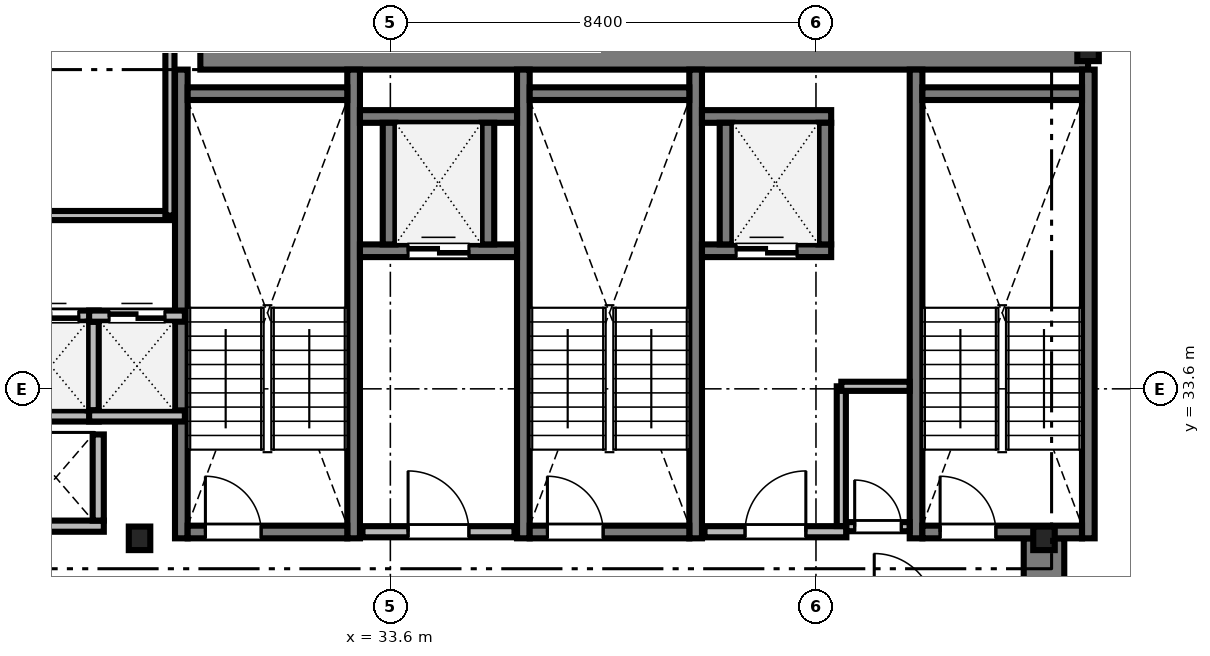
"""IFC4 building model, lengths in metres.
Left out: names, types, materials, properties, quantities, classifications, styles, units other than length and angle.
Written with IfcOpenShell. Run it as: python <this file> out.ifc"""

import sys

from ifc_helpers import new_model, si_unit, direction, frame, frame_2d, origin, origin_2d, place, context, subcontext, project, spatial, rectangle, i_section, extrude, source, transform, mapped, element, fill, save


model = new_model("IFC4")
c1 = context("Model", 3, precision=1e-05, world=origin(), true_north=direction((0.0, 1.0)))
c2 = subcontext(c1, "Body", "Model", "MODEL_VIEW")
j1 = project(units=[si_unit("LENGTHUNIT", "METRE"), si_unit("PLANEANGLEUNIT", "RADIAN")], contexts=[c1])
p1 = place(None, origin())
s1 = spatial("IfcSite", under=j1, at=p1, CompositionType="ELEMENT")
p2 = place(p1, origin())
s2 = spatial("IfcBuilding", under=s1, at=p2, CompositionType="ELEMENT")
p3 = place(p2, frame((0.0, 0.0, 163.1)))
s3 = spatial("IfcBuildingStorey", under=s2, at=p3, CompositionType="ELEMENT", Elevation=163.1)
m1 = source(origin(), c2, "Body", "SweptSolid", [
    extrude(rectangle(XDim=17.52, YDim=0.8, at=frame_2d((8.76, 0.0))), origin(), (0.0, 0.0, 1.0), 3.05),
])
p4 = place(p3, frame((29.85, 40.3, 0.0), z_axis=(0.0, 0.0, 1.0), x_axis=(1.0, 0.0, 0.0)))
e1 = element("IfcWall", 1, at=p4, inside=s3, PredefinedType="SHEAR", context=c2, shape_type="MappedRepresentation", body=[
    mapped(m1, transform((0.0, 0.0, 0.0), scale=1.0)),
])
m2 = source(origin(), c2, "Body", "SweptSolid", [
    extrude(rectangle(XDim=13.15, YDim=0.8, at=frame_2d((6.575, 0.0))), origin(), (0.0, 0.0, 1.0), 3.05),
])
p5 = place(p3, frame((46.5, 17.5, 0.0), z_axis=(0.0, 0.0, 1.0), x_axis=(0.0, 1.0, 0.0)))
e2 = element("IfcWall", 2, at=p5, inside=s3, PredefinedType="SHEAR", context=c2, shape_type="MappedRepresentation", body=[
    mapped(m2, transform((0.0, 0.0, 0.0), scale=1.0)),
])
m3 = source(origin(), c2, "Body", "SweptSolid", [
    extrude(i_section(OverallWidth=0.424, OverallDepth=0.465, WebThickness=0.035, FlangeThickness=0.056, FilletRadius=0.015, at=origin_2d()), origin(), (0.0, 0.0, 1.0), 3.05),
])
for number, where, z_axis, x_axis in (
    (3, (28.65, 30.65, 0.0), (0.0, 0.0, 1.0), (1.0, 0.0, 0.0)),
    (4, (46.5, 30.65, 0.0), (0.0, 0.0, 1.0), (1.0, 0.0, 0.0)),
    (5, (47.37, 40.3, 0.0), (0.0, 0.0, 1.0), (1.0, 0.0, 0.0)),
):
    element("IfcColumn", number, at=place(p3, frame(where, z_axis=z_axis, x_axis=x_axis)), inside=s3, PredefinedType="COLUMN", context=c2, shape_type="MappedRepresentation", body=[
        mapped(m3, transform((0.0, 0.0, 0.0), scale=1.0)),
    ])
m4 = source(origin(), c2, "Body", "SweptSolid", [
    extrude(rectangle(XDim=9.25, YDim=0.25, at=frame_2d((4.625, 0.0))), origin(), (0.0, 0.0, 1.0), 3.5),
])
for number, where, z_axis, x_axis in (
    (6, (29.475, 30.65, 0.0), (0.0, 0.0, 1.0), (0.0, 1.0, 0.0)),
    (7, (32.875, 30.65, 0.0), (0.0, 0.0, 1.0), (0.0, 1.0, 0.0)),
):
    element("IfcWall", number, at=place(p3, frame(where, z_axis=z_axis, x_axis=x_axis)), inside=s3, PredefinedType="SOLIDWALL", context=c2, shape_type="MappedRepresentation", body=[
        mapped(m4, transform((0.0, 0.0, 0.0), scale=1.0)),
    ])
m5 = source(origin(), c2, "Body", "SweptSolid", [
    extrude(rectangle(XDim=3.15, YDim=0.25, at=frame_2d((1.575, 0.0))), origin(), (0.0, 0.0, 1.0), 3.5),
])
p6 = place(p3, frame((29.6, 39.425, 0.0), z_axis=(0.0, 0.0, 1.0), x_axis=(1.0, 0.0, 0.0)))
e8 = element("IfcWall", 8, at=p6, inside=s3, PredefinedType="SOLIDWALL", context=c2, shape_type="MappedRepresentation", body=[
    mapped(m5, transform((0.0, 0.0, 0.0), scale=1.0)),
])
p7 = place(p3, frame((29.6, 30.775, 0.0), z_axis=(0.0, 0.0, 1.0), x_axis=(1.0, 0.0, 0.0)))
e9 = element("IfcWall", 9, at=p7, inside=s3, PredefinedType="SOLIDWALL", context=c2, shape_type="MappedRepresentation", body=[
    mapped(m5, transform((0.0, 0.0, 0.0), scale=1.0)),
])
m6 = source(origin(), c2, "Body", "SweptSolid", [
    extrude(rectangle(XDim=1.1, YDim=2.2, at=frame_2d((0.55, 1.1))), frame((0.0, 0.135, 0.0), z_axis=(0.0, -1.0, 0.0), x_axis=(1.0, 0.0, 0.0)), (0.0, 0.0, 1.0), 0.27),
])
p8 = place(p7, frame((0.35, 0.0, 0.0)))
e10 = element("IfcOpeningElement", 10, at=p8, cuts=e9, PredefinedType="OPENING", context=c2, shape_type="MappedRepresentation", body=[
    mapped(m6, transform((0.0, 0.0, 0.0), scale=1.0)),
])
for number, where, z_axis, x_axis in (
    (11, (36.225, 30.65, 0.0), (0.0, 0.0, 1.0), (0.0, 1.0, 0.0)),
    (12, (39.625, 30.65, 0.0), (0.0, 0.0, 1.0), (0.0, 1.0, 0.0)),
):
    element("IfcWall", number, at=place(p3, frame(where, z_axis=z_axis, x_axis=x_axis)), inside=s3, PredefinedType="SOLIDWALL", context=c2, shape_type="MappedRepresentation", body=[
        mapped(m4, transform((0.0, 0.0, 0.0), scale=1.0)),
    ])
p9 = place(p3, frame((36.35, 39.425, 0.0), z_axis=(0.0, 0.0, 1.0), x_axis=(1.0, 0.0, 0.0)))
e13 = element("IfcWall", 13, at=p9, inside=s3, PredefinedType="SOLIDWALL", context=c2, shape_type="MappedRepresentation", body=[
    mapped(m5, transform((0.0, 0.0, 0.0), scale=1.0)),
])
p10 = place(p3, frame((36.35, 30.775, 0.0), z_axis=(0.0, 0.0, 1.0), x_axis=(1.0, 0.0, 0.0)))
e14 = element("IfcWall", 14, at=p10, inside=s3, PredefinedType="SOLIDWALL", context=c2, shape_type="MappedRepresentation", body=[
    mapped(m5, transform((0.0, 0.0, 0.0), scale=1.0)),
])
p11 = place(p10, frame((0.35, 0.0, 0.0)))
e15 = element("IfcOpeningElement", 15, at=p11, cuts=e14, PredefinedType="OPENING", context=c2, shape_type="MappedRepresentation", body=[
    mapped(m6, transform((0.0, 0.0, 0.0), scale=1.0)),
])
for number, where, z_axis, x_axis in (
    (16, (43.975, 30.65, 0.0), (0.0, 0.0, 1.0), (0.0, 1.0, 0.0)),
    (17, (47.375, 30.65, 0.0), (0.0, 0.0, 1.0), (0.0, 1.0, 0.0)),
):
    element("IfcWall", number, at=place(p3, frame(where, z_axis=z_axis, x_axis=x_axis)), inside=s3, PredefinedType="SOLIDWALL", context=c2, shape_type="MappedRepresentation", body=[
        mapped(m4, transform((0.0, 0.0, 0.0), scale=1.0)),
    ])
p12 = place(p3, frame((44.1, 39.425, 0.0), z_axis=(0.0, 0.0, 1.0), x_axis=(1.0, 0.0, 0.0)))
e18 = element("IfcWall", 18, at=p12, inside=s3, PredefinedType="SOLIDWALL", context=c2, shape_type="MappedRepresentation", body=[
    mapped(m5, transform((0.0, 0.0, 0.0), scale=1.0)),
])
p13 = place(p3, frame((44.1, 30.775, 0.0), z_axis=(0.0, 0.0, 1.0), x_axis=(1.0, 0.0, 0.0)))
e19 = element("IfcWall", 19, at=p13, inside=s3, PredefinedType="SOLIDWALL", context=c2, shape_type="MappedRepresentation", body=[
    mapped(m5, transform((0.0, 0.0, 0.0), scale=1.0)),
])
p14 = place(p13, frame((0.35, 0.0, 0.0)))
e20 = element("IfcOpeningElement", 20, at=p14, cuts=e19, PredefinedType="OPENING", context=c2, shape_type="MappedRepresentation", body=[
    mapped(m6, transform((0.0, 0.0, 0.0), scale=1.0)),
])
m7 = source(origin(), c2, "Body", "SweptSolid", [
    extrude(rectangle(XDim=3.0, YDim=0.22, at=frame_2d((1.5, 0.0))), origin(), (0.0, 0.0, 1.0), 3.05),
])
p15 = place(p3, frame((33.05, 30.78, 0.0), z_axis=(0.0, 0.0, 1.0), x_axis=(1.0, 0.0, 0.0)))
e21 = element("IfcWall", 21, at=p15, inside=s3, PredefinedType="SOLIDWALL", context=c2, shape_type="MappedRepresentation", body=[
    mapped(m7, transform((0.0, 0.0, 0.0), scale=1.0)),
])
m8 = source(origin(), c2, "Body", "SweptSolid", [
    extrude(rectangle(XDim=1.2, YDim=2.2, at=frame_2d((0.6, 1.1))), frame((0.0, 0.12, 0.0), z_axis=(0.0, -1.0, 0.0), x_axis=(1.0, 0.0, 0.0)), (0.0, 0.0, 1.0), 0.24),
])
p16 = place(p15, frame((0.9, 0.0, 0.0)))
e22 = element("IfcOpeningElement", 22, at=p16, cuts=e21, PredefinedType="OPENING", context=c2, shape_type="MappedRepresentation", body=[
    mapped(m8, transform((0.0, 0.0, 0.0), scale=1.0)),
])
m9 = source(origin(), c2, "Body", "SweptSolid", [
    extrude(rectangle(XDim=2.8, YDim=0.22, at=frame_2d((1.4, 0.0))), origin(), (0.0, 0.0, 1.0), 3.05),
])
p17 = place(p3, frame((39.8, 30.78, 0.0), z_axis=(0.0, 0.0, 1.0), x_axis=(1.0, 0.0, 0.0)))
e23 = element("IfcWall", 23, at=p17, inside=s3, PredefinedType="SOLIDWALL", context=c2, shape_type="MappedRepresentation", body=[
    mapped(m9, transform((0.0, 0.0, 0.0), scale=1.0)),
])
p18 = place(p17, frame((0.8, 0.0, 0.0)))
e24 = element("IfcOpeningElement", 24, at=p18, cuts=e23, PredefinedType="OPENING", context=c2, shape_type="MappedRepresentation", body=[
    mapped(m8, transform((0.0, 0.0, 0.0), scale=1.0)),
])
m10 = source(origin(), c2, "Body", "SweptSolid", [
    extrude(rectangle(XDim=1.89, YDim=0.22, at=frame_2d((0.945, 0.0))), origin(), (0.0, 0.0, 1.0), 3.05),
])
p19 = place(p3, frame((25.955, 33.065, 0.0), z_axis=(0.0, 0.0, 1.0), x_axis=(1.0, 0.0, 0.0)))
e25 = element("IfcWall", 25, at=p19, inside=s3, PredefinedType="SOLIDWALL", context=c2, shape_type="MappedRepresentation", body=[
    mapped(m10, transform((0.0, 0.0, 0.0), scale=1.0)),
])
p20 = place(p3, frame((25.955, 35.035, 0.0), z_axis=(0.0, 0.0, 1.0), x_axis=(1.0, 0.0, 0.0)))
e26 = element("IfcWall", 26, at=p20, inside=s3, PredefinedType="SOLIDWALL", context=c2, shape_type="MappedRepresentation", body=[
    mapped(m10, transform((0.0, 0.0, 0.0), scale=1.0)),
])
m11 = source(origin(), c2, "Body", "SweptSolid", [
    extrude(rectangle(XDim=1.1, YDim=2.2, at=frame_2d((0.55, 1.1))), frame((0.0, 0.12, 0.0), z_axis=(0.0, -1.0, 0.0), x_axis=(1.0, 0.0, 0.0)), (0.0, 0.0, 1.0), 0.24),
])
p21 = place(p20, frame((0.395, 0.0, 0.0)))
e27 = element("IfcOpeningElement", 27, at=p21, cuts=e26, PredefinedType="OPENING", context=c2, shape_type="MappedRepresentation", body=[
    mapped(m11, transform((0.0, 0.0, 0.0), scale=1.0)),
])
m12 = source(origin(), c2, "Body", "SweptSolid", [
    extrude(rectangle(XDim=1.75, YDim=0.22, at=frame_2d((0.875, 0.0))), origin(), (0.0, 0.0, 1.0), 3.05),
])
p22 = place(p3, frame((27.735, 33.175, 0.0), z_axis=(0.0, 0.0, 1.0), x_axis=(0.0, 1.0, 0.0)))
e28 = element("IfcWall", 28, at=p22, inside=s3, PredefinedType="SOLIDWALL", context=c2, shape_type="MappedRepresentation", body=[
    mapped(m12, transform((0.0, 0.0, 0.0), scale=1.0)),
])
p23 = place(p3, frame((27.655, 33.065, 0.0), z_axis=(0.0, 0.0, 1.0), x_axis=(1.0, 0.0, 0.0)))
e29 = element("IfcWall", 29, at=p23, inside=s3, PredefinedType="SOLIDWALL", context=c2, shape_type="MappedRepresentation", body=[
    mapped(m10, transform((0.0, 0.0, 0.0), scale=1.0)),
])
p24 = place(p3, frame((27.655, 35.035, 0.0), z_axis=(0.0, 0.0, 1.0), x_axis=(1.0, 0.0, 0.0)))
e30 = element("IfcWall", 30, at=p24, inside=s3, PredefinedType="SOLIDWALL", context=c2, shape_type="MappedRepresentation", body=[
    mapped(m10, transform((0.0, 0.0, 0.0), scale=1.0)),
])
p25 = place(p24, frame((0.395, 0.0, 0.0)))
e31 = element("IfcOpeningElement", 31, at=p25, cuts=e30, PredefinedType="OPENING", context=c2, shape_type="MappedRepresentation", body=[
    mapped(m11, transform((0.0, 0.0, 0.0), scale=1.0)),
])
m13 = source(origin(), c2, "Body", "SweptSolid", [
    extrude(rectangle(XDim=3.1, YDim=0.25, at=frame_2d((1.55, 0.0))), origin(), (0.0, 0.0, 1.0), 3.05),
])
p26 = place(p3, frame((33.0, 36.325, 0.0), z_axis=(0.0, 0.0, 1.0), x_axis=(1.0, 0.0, 0.0)))
e32 = element("IfcWall", 32, at=p26, inside=s3, PredefinedType="SOLIDWALL", context=c2, shape_type="MappedRepresentation", body=[
    mapped(m13, transform((0.0, 0.0, 0.0), scale=1.0)),
])
m14 = source(origin(), c2, "Body", "SweptSolid", [
    extrude(rectangle(XDim=1.2, YDim=2.25, at=frame_2d((0.6, 1.125))), frame((0.0, 0.135, 0.0), z_axis=(0.0, -1.0, 0.0), x_axis=(1.0, 0.0, 0.0)), (0.0, 0.0, 1.0), 0.27),
])
p27 = place(p26, frame((0.95, 0.0, 0.0)))
e33 = element("IfcOpeningElement", 33, at=p27, cuts=e32, PredefinedType="OPENING", context=c2, shape_type="MappedRepresentation", body=[
    mapped(m14, transform((0.0, 0.0, 0.0), scale=1.0)),
])
p28 = place(p3, frame((33.0, 38.975, 0.0), z_axis=(0.0, 0.0, 1.0), x_axis=(1.0, 0.0, 0.0)))
e34 = element("IfcWall", 34, at=p28, inside=s3, PredefinedType="SOLIDWALL", context=c2, shape_type="MappedRepresentation", body=[
    mapped(m13, transform((0.0, 0.0, 0.0), scale=1.0)),
])
m15 = source(origin(), c2, "Body", "SweptSolid", [
    extrude(rectangle(XDim=2.4, YDim=0.25, at=frame_2d((1.2, 0.0))), origin(), (0.0, 0.0, 1.0), 3.05),
])
for number, where, z_axis, x_axis in (
    (35, (33.575, 36.45, 0.0), (0.0, 0.0, 1.0), (0.0, 1.0, 0.0)),
    (36, (35.525, 36.45, 0.0), (0.0, 0.0, 1.0), (0.0, 1.0, 0.0)),
):
    element("IfcWall", number, at=place(p3, frame(where, z_axis=z_axis, x_axis=x_axis)), inside=s3, PredefinedType="SOLIDWALL", context=c2, shape_type="MappedRepresentation", body=[
        mapped(m15, transform((0.0, 0.0, 0.0), scale=1.0)),
    ])
m16 = source(origin(), c2, "Body", "SweptSolid", [
    extrude(rectangle(XDim=2.55, YDim=0.25, at=frame_2d((1.275, 0.0))), origin(), (0.0, 0.0, 1.0), 3.05),
])
p29 = place(p3, frame((39.75, 36.325, 0.0), z_axis=(0.0, 0.0, 1.0), x_axis=(1.0, 0.0, 0.0)))
e37 = element("IfcWall", 37, at=p29, inside=s3, PredefinedType="SOLIDWALL", context=c2, shape_type="MappedRepresentation", body=[
    mapped(m16, transform((0.0, 0.0, 0.0), scale=1.0)),
])
p30 = place(p29, frame((0.675, 0.0, 0.0)))
e38 = element("IfcOpeningElement", 38, at=p30, cuts=e37, PredefinedType="OPENING", context=c2, shape_type="MappedRepresentation", body=[
    mapped(m14, transform((0.0, 0.0, 0.0), scale=1.0)),
])
p31 = place(p3, frame((39.75, 38.975, 0.0), z_axis=(0.0, 0.0, 1.0), x_axis=(1.0, 0.0, 0.0)))
e39 = element("IfcWall", 39, at=p31, inside=s3, PredefinedType="SOLIDWALL", context=c2, shape_type="MappedRepresentation", body=[
    mapped(m16, transform((0.0, 0.0, 0.0), scale=1.0)),
])
for number, where, z_axis, x_axis in (
    (40, (40.225, 36.45, 0.0), (0.0, 0.0, 1.0), (0.0, 1.0, 0.0)),
    (41, (42.175, 36.45, 0.0), (0.0, 0.0, 1.0), (0.0, 1.0, 0.0)),
):
    element("IfcWall", number, at=place(p3, frame(where, z_axis=z_axis, x_axis=x_axis)), inside=s3, PredefinedType="SOLIDWALL", context=c2, shape_type="MappedRepresentation", body=[
        mapped(m15, transform((0.0, 0.0, 0.0), scale=1.0)),
    ])
m17 = source(origin(), c2, "Body", "SweptSolid", [
    extrude(rectangle(XDim=1.89, YDim=0.22, at=frame_2d((0.945, 0.0))), origin(), (0.0, 0.0, 1.0), 3.05),
])
p32 = place(p3, frame((26.055, 30.89, 0.0), z_axis=(0.0, 0.0, 1.0), x_axis=(1.0, 0.0, 0.0)))
e42 = element("IfcWall", 42, at=p32, inside=s3, PredefinedType="SOLIDWALL", context=c2, shape_type="MappedRepresentation", body=[
    mapped(m17, transform((0.0, 0.0, 0.0), scale=1.0)),
])
m18 = source(origin(), c2, "Body", "SweptSolid", [
    extrude(rectangle(XDim=1.7, YDim=0.22, at=frame_2d((0.85, 0.0))), origin(), (0.0, 0.0, 1.0), 3.05),
])
p33 = place(p3, frame((27.835, 31.0, 0.0), z_axis=(0.0, 0.0, 1.0), x_axis=(0.0, 1.0, 0.0)))
e43 = element("IfcWall", 43, at=p33, inside=s3, PredefinedType="SOLIDWALL", context=c2, shape_type="MappedRepresentation", body=[
    mapped(m18, transform((0.0, 0.0, 0.0), scale=1.0)),
])
m19 = source(origin(), c2, "Body", "SweptSolid", [
    extrude(rectangle(XDim=22.328, YDim=0.18, at=frame_2d((11.164, 0.0))), origin(), (0.0, 0.0, 1.0), 2.326),
])
p34 = place(p3, frame((6.922, 37.02, 0.0), z_axis=(0.0, 0.0, 1.0), x_axis=(1.0, 0.0, 0.0)))
e44 = element("IfcWall", 44, at=p34, inside=s3, PredefinedType="PARTITIONING", context=c2, shape_type="MappedRepresentation", body=[
    mapped(m19, transform((0.0, 0.0, 0.0), scale=1.0)),
])
m20 = source(origin(), c2, "Body", "SweptSolid", [
    extrude(rectangle(XDim=1.05, YDim=2.2, at=frame_2d((0.525, 1.1))), frame((0.0, 0.1, 0.0), z_axis=(0.0, -1.0, 0.0), x_axis=(1.0, 0.0, 0.0)), (0.0, 0.0, 1.0), 0.2),
])
p35 = place(p34, frame((14.928, 0.0, 0.0)))
e45 = element("IfcOpeningElement", 45, at=p35, cuts=e44, PredefinedType="OPENING", context=c2, shape_type="MappedRepresentation", body=[
    mapped(m20, transform((0.0, 0.0, 0.0), scale=1.0)),
])
m21 = source(origin(), c2, "Body", "SweptSolid", [
    extrude(rectangle(XDim=1.248, YDim=0.18, at=frame_2d((0.624, 0.0))), origin(), (0.0, 0.0, 1.0), 3.05),
])
p36 = place(p3, frame((42.6, 30.88, 0.0), z_axis=(0.0, 0.0, 1.0), x_axis=(1.0, 0.0, 0.0)))
e46 = element("IfcWall", 46, at=p36, inside=s3, PredefinedType="PARTITIONING", context=c2, shape_type="MappedRepresentation", body=[
    mapped(m21, transform((0.0, 0.0, 0.0), scale=1.0)),
])
m22 = source(origin(), c2, "Body", "SweptSolid", [
    extrude(rectangle(XDim=0.92, YDim=2.1, at=frame_2d((0.46, 1.05))), frame((0.0, 0.1, 0.0), z_axis=(0.0, -1.0, 0.0), x_axis=(1.0, 0.0, 0.0)), (0.0, 0.0, 1.0), 0.2),
])
p37 = place(p36, frame((0.164, 0.0, 0.0)))
e47 = element("IfcOpeningElement", 47, at=p37, cuts=e46, PredefinedType="OPENING", context=c2, shape_type="MappedRepresentation", body=[
    mapped(m22, transform((0.0, 0.0, 0.0), scale=1.0)),
])
m23 = source(origin(), c2, "Body", "SweptSolid", [
    extrude(rectangle(XDim=11.45, YDim=0.18, at=frame_2d((5.725, 0.0))), origin(), (0.0, 0.0, 1.0), 2.326),
])
p38 = place(p3, frame((29.25, 37.02, 0.0), z_axis=(0.0, 0.0, 1.0), x_axis=(0.0, 1.0, 0.0)))
e48 = element("IfcWall", 48, at=p38, inside=s3, PredefinedType="PARTITIONING", context=c2, shape_type="MappedRepresentation", body=[
    mapped(m23, transform((0.0, 0.0, 0.0), scale=1.0)),
])
m24 = source(origin(), c2, "Body", "SweptSolid", [
    extrude(rectangle(XDim=2.758, YDim=0.18, at=frame_2d((1.379, 0.0))), origin(), (0.0, 0.0, 1.0), 3.05),
])
p39 = place(p3, frame((42.5, 30.892, 0.0), z_axis=(0.0, 0.0, 1.0), x_axis=(0.0, 1.0, 0.0)))
e49 = element("IfcWall", 49, at=p39, inside=s3, PredefinedType="PARTITIONING", context=c2, shape_type="MappedRepresentation", body=[
    mapped(m24, transform((0.0, 0.0, 0.0), scale=1.0)),
])
m25 = source(origin(), c2, "Body", "SweptSolid", [
    extrude(rectangle(XDim=1.348, YDim=0.18, at=frame_2d((0.674, 0.0))), origin(), (0.0, 0.0, 1.0), 3.05),
])
p40 = place(p3, frame((42.5, 33.65, 0.0), z_axis=(0.0, 0.0, 1.0), x_axis=(1.0, 0.0, 0.0)))
e50 = element("IfcWall", 50, at=p40, inside=s3, PredefinedType="PARTITIONING", context=c2, shape_type="MappedRepresentation", body=[
    mapped(m25, transform((0.0, 0.0, 0.0), scale=1.0)),
])
m26 = source(origin(), c2, "Body", "SweptSolid", [
    extrude(rectangle(XDim=1.1, YDim=2.2, at=frame_2d((0.55, 1.1))), frame((0.0, 0.025, 0.0), z_axis=(0.0, -1.0, 0.0), x_axis=(1.0, 0.0, 0.0)), (0.0, 0.0, 1.0), 0.05),
])
p41 = place(p8, origin())
e51 = element("IfcDoor", 51, at=p41, inside=s3, OperationType="SINGLE_SWING_LEFT", PredefinedType="DOOR", context=c2, shape_type="MappedRepresentation", body=[
    mapped(m26, transform((0.0, 0.0, 0.0), scale=1.0)),
])
fill(e10, e51)
p42 = place(p11, origin())
e52 = element("IfcDoor", 52, at=p42, inside=s3, OperationType="SINGLE_SWING_LEFT", PredefinedType="DOOR", context=c2, shape_type="MappedRepresentation", body=[
    mapped(m26, transform((0.0, 0.0, 0.0), scale=1.0)),
])
fill(e15, e52)
p43 = place(p14, origin())
e53 = element("IfcDoor", 53, at=p43, inside=s3, OperationType="SINGLE_SWING_LEFT", PredefinedType="DOOR", context=c2, shape_type="MappedRepresentation", body=[
    mapped(m26, transform((0.0, 0.0, 0.0), scale=1.0)),
])
fill(e20, e53)
m27 = source(origin(), c2, "Body", "SweptSolid", [
    extrude(rectangle(XDim=1.2, YDim=2.2, at=frame_2d((0.6, 1.1))), frame((0.0, 0.025, 0.0), z_axis=(0.0, -1.0, 0.0), x_axis=(1.0, 0.0, 0.0)), (0.0, 0.0, 1.0), 0.05),
])
p44 = place(p16, origin())
e54 = element("IfcDoor", 54, at=p44, inside=s3, OperationType="SINGLE_SWING_LEFT", PredefinedType="DOOR", context=c2, shape_type="MappedRepresentation", body=[
    mapped(m27, transform((0.0, 0.0, 0.0), scale=1.0)),
])
fill(e22, e54)
p45 = place(p18, origin())
e55 = element("IfcDoor", 55, at=p45, inside=s3, OperationType="SINGLE_SWING_RIGHT", PredefinedType="DOOR", context=c2, shape_type="MappedRepresentation", body=[
    mapped(m27, transform((0.0, 0.0, 0.0), scale=1.0)),
])
fill(e24, e55)
p46 = place(p21, origin())
e56 = element("IfcDoor", 56, at=p46, inside=s3, OperationType="DOUBLE_DOOR_SLIDING", PredefinedType="DOOR", context=c2, shape_type="MappedRepresentation", body=[
    mapped(m26, transform((0.0, 0.0, 0.0), scale=1.0)),
])
fill(e27, e56)
p47 = place(p25, origin())
e57 = element("IfcDoor", 57, at=p47, inside=s3, OperationType="DOUBLE_DOOR_SLIDING", PredefinedType="DOOR", context=c2, shape_type="MappedRepresentation", body=[
    mapped(m26, transform((0.0, 0.0, 0.0), scale=1.0)),
])
fill(e31, e57)
m28 = source(origin(), c2, "Body", "SweptSolid", [
    extrude(rectangle(XDim=1.2, YDim=2.25, at=frame_2d((0.6, 1.125))), frame((0.0, 0.025, 0.0), z_axis=(0.0, -1.0, 0.0), x_axis=(1.0, 0.0, 0.0)), (0.0, 0.0, 1.0), 0.05),
])
p48 = place(p27, origin())
e58 = element("IfcDoor", 58, at=p48, inside=s3, OperationType="DOUBLE_DOOR_SLIDING", PredefinedType="DOOR", context=c2, shape_type="MappedRepresentation", body=[
    mapped(m28, transform((0.0, 0.0, 0.0), scale=1.0)),
])
fill(e33, e58)
p49 = place(p30, origin())
e59 = element("IfcDoor", 59, at=p49, inside=s3, OperationType="DOUBLE_DOOR_SLIDING", PredefinedType="DOOR", context=c2, shape_type="MappedRepresentation", body=[
    mapped(m28, transform((0.0, 0.0, 0.0), scale=1.0)),
])
fill(e38, e59)
m29 = source(origin(), c2, "Body", "SweptSolid", [
    extrude(rectangle(XDim=0.92, YDim=2.1, at=frame_2d((0.46, 1.05))), frame((0.0, 0.025, 0.0), z_axis=(0.0, -1.0, 0.0), x_axis=(1.0, 0.0, 0.0)), (0.0, 0.0, 1.0), 0.05),
])
p50 = place(p37, origin())
e60 = element("IfcDoor", 60, at=p50, inside=s3, OperationType="SINGLE_SWING_LEFT", PredefinedType="DOOR", context=c2, shape_type="MappedRepresentation", body=[
    mapped(m29, transform((0.0, 0.0, 0.0), scale=1.0)),
])
fill(e47, e60)
save(model, sys.argv[1])
